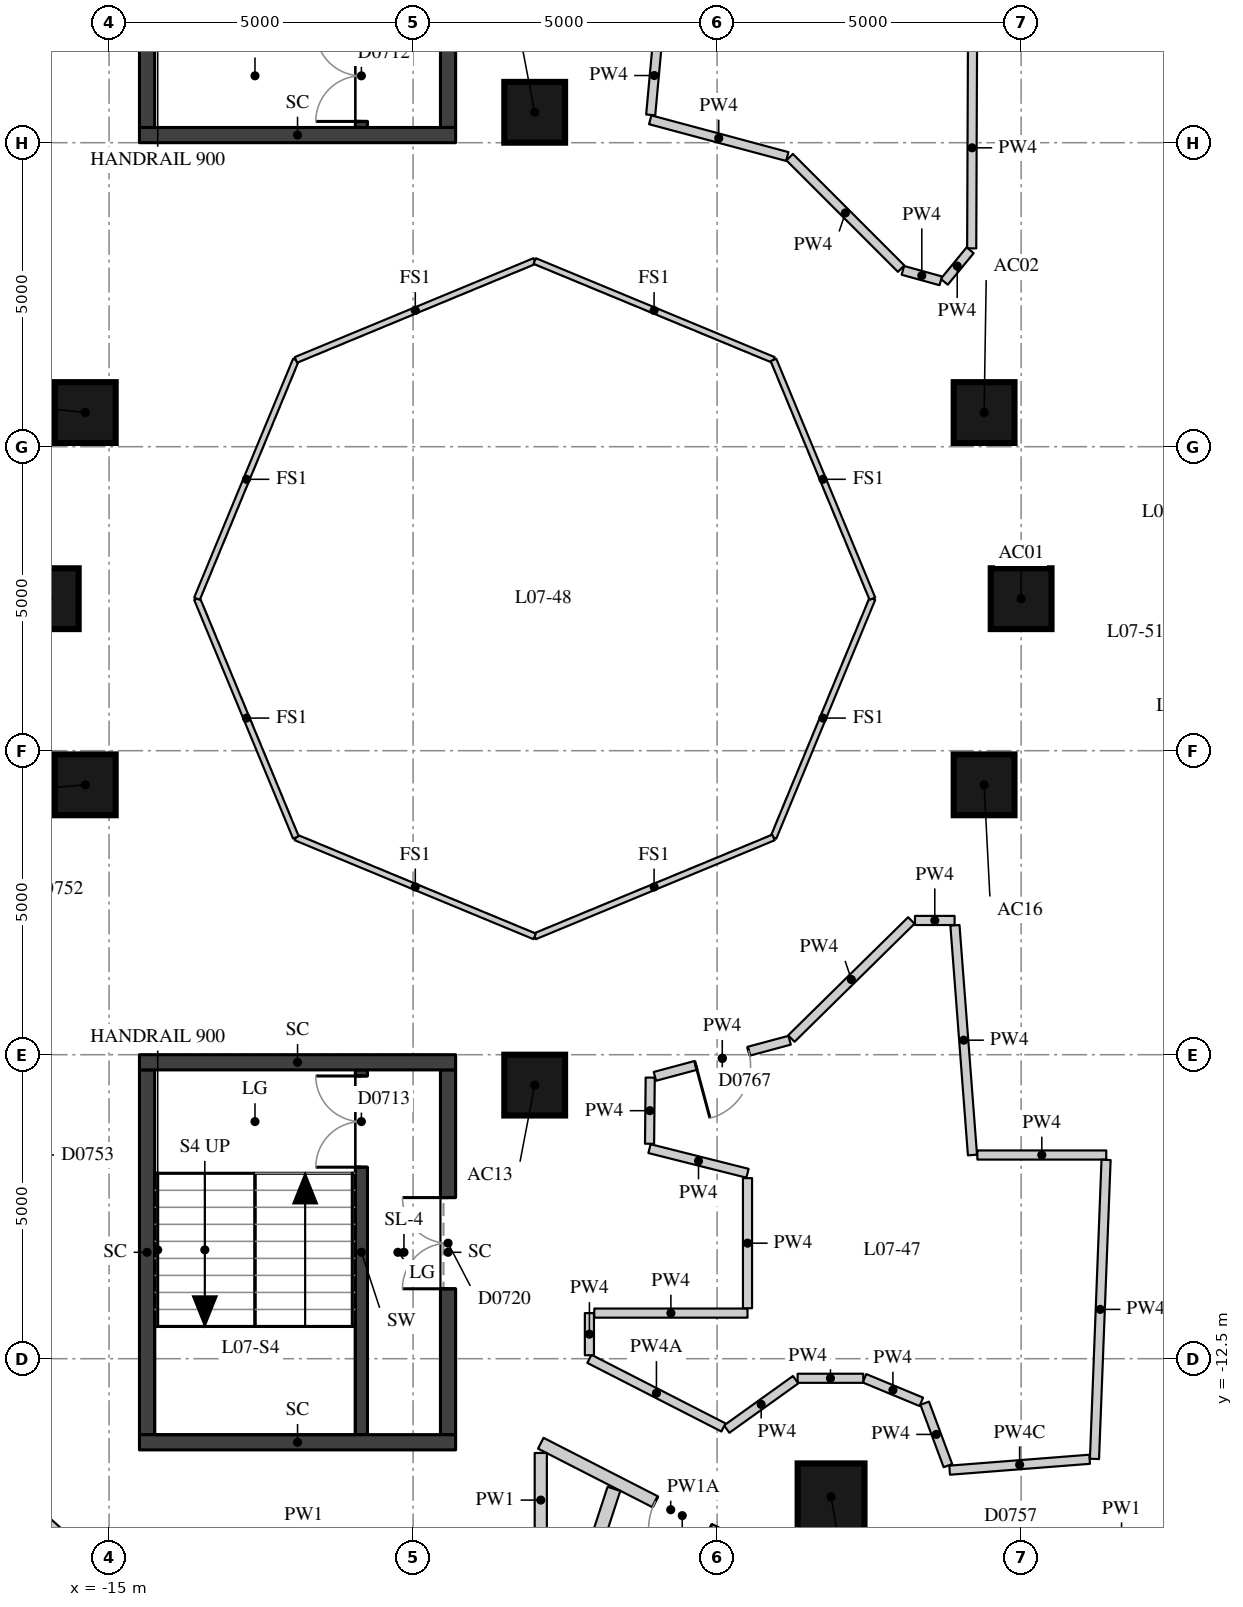
"""IFC4 building model, lengths in metres.
Left out: names, types, materials, properties, quantities, classifications, styles, units other than length and angle.
Written with IfcOpenShell. Run it as: python <this file> out.ifc"""

import sys

from ifc_helpers import new_model, si_unit, direction, frame, frame_2d, origin, origin_2d, place, context, subcontext, project, spatial, rectangle, extrude, element, fill, save


model = new_model("IFC4")
c1 = context("Model", 3, precision=1e-05, world=origin(), true_north=direction((0.0, 1.0)))
c2 = subcontext(c1, "Body", "Model", "MODEL_VIEW")
j1 = project(units=[si_unit("LENGTHUNIT", "METRE"), si_unit("PLANEANGLEUNIT", "RADIAN")], contexts=[c1])
p1 = place(None, origin())
s1 = spatial("IfcSite", under=j1, at=p1, CompositionType="ELEMENT")
p2 = place(p1, origin())
s2 = spatial("IfcBuilding", under=s1, at=p2, CompositionType="ELEMENT")
p3 = place(p2, frame((0.0, 0.0, 31.6)))
s3 = spatial("IfcBuildingStorey", under=s2, at=p3, CompositionType="ELEMENT", Elevation=31.6)
for number, where, z_axis, x_axis in (
    (1, (0.0, 0.0, 0.0), (0.0, 0.0, 1.0), (1.0, 0.0, 0.0)),
    (2, (-0.609, 3.062, 0.0), (0.0, 0.0, 1.0), (1.0, 0.0, 0.0)),
    (3, (-8.0, 8.0, 0.0), (0.0, 0.0, 1.0), (1.0, 0.0, 0.0)),
    (4, (-15.391, 3.062, 0.0), (0.0, 0.0, 1.0), (1.0, 0.0, 0.0)),
    (5, (-16.0, 0.0, 0.0), (0.0, 0.0, 1.0), (1.0, 0.0, 0.0)),
    (6, (-15.391, -3.062, 0.0), (0.0, 0.0, 1.0), (1.0, 0.0, 0.0)),
    (7, (-8.0, -8.0, 0.0), (0.0, 0.0, 1.0), (1.0, 0.0, 0.0)),
    (8, (-0.609, -3.062, 0.0), (0.0, 0.0, 1.0), (1.0, 0.0, 0.0)),
):
    element("IfcColumn", number, at=place(p3, frame(where, z_axis=z_axis, x_axis=x_axis)), inside=s3, PredefinedType="COLUMN", context=c2, shape_type="SweptSolid", body=[
        extrude(rectangle(XDim=1.0, YDim=1.0, at=origin_2d()), origin(), (0.0, 0.0, 1.0), 3.3),
    ])
p4 = place(p3, frame((-3.126, -14.772, 0.0), z_axis=(0.0, 0.0, 1.0), x_axis=(1.0, 0.0, 0.0)))
e9 = element("IfcColumn", 9, at=p4, inside=s3, PredefinedType="COLUMN", context=c2, shape_type="SweptSolid", body=[
    extrude(rectangle(XDim=1.1, YDim=1.1, at=origin_2d()), origin(), (0.0, 0.0, 1.0), 3.3),
])
p5 = place(p3, frame((-10.85, 7.75, 0.0), z_axis=(0.0, 0.0, 1.0), x_axis=(0.0, 1.0, 0.0)))
e10 = element("IfcWall", 10, at=p5, inside=s3, PredefinedType="SHEAR", context=c2, shape_type="SweptSolid", body=[
    extrude(rectangle(XDim=6.0, YDim=0.2, at=frame_2d((3.0, 0.0))), origin(), (0.0, 0.0, 1.0), 3.02),
])
p6 = place(p5, frame((0.1, 0.0, 0.0)))
e11 = element("IfcOpeningElement", 11, at=p6, cuts=e10, PredefinedType="OPENING", context=c2, shape_type="SweptSolid", body=[
    extrude(rectangle(XDim=1.5, YDim=2.1, at=frame_2d((0.75, 1.05))), frame((0.0, 0.11, 0.0), z_axis=(0.0, -1.0, 0.0), x_axis=(1.0, 0.0, 0.0)), (0.0, 0.0, 1.0), 0.22),
])
p7 = place(p3, frame((-10.85, -13.75, 0.0), z_axis=(0.0, 0.0, 1.0), x_axis=(0.0, 1.0, 0.0)))
e12 = element("IfcWall", 12, at=p7, inside=s3, PredefinedType="SHEAR", context=c2, shape_type="SweptSolid", body=[
    extrude(rectangle(XDim=6.0, YDim=0.2, at=frame_2d((3.0, 0.0))), origin(), (0.0, 0.0, 1.0), 3.02),
])
p8 = place(p7, frame((4.4, 0.0, 0.0)))
e13 = element("IfcOpeningElement", 13, at=p8, cuts=e12, PredefinedType="OPENING", context=c2, shape_type="SweptSolid", body=[
    extrude(rectangle(XDim=1.5, YDim=2.1, at=frame_2d((0.75, 1.05))), frame((0.0, 0.11, 0.0), z_axis=(0.0, -1.0, 0.0), x_axis=(1.0, 0.0, 0.0)), (0.0, 0.0, 1.0), 0.22),
])
p9 = place(p3, frame((-14.375, 7.75, -0.28), z_axis=(0.0, 0.0, 1.0), x_axis=(0.0, 1.0, 0.0)))
e14 = element("IfcWall", 14, at=p9, inside=s3, PredefinedType="SHEAR", context=c2, shape_type="SweptSolid", body=[
    extrude(rectangle(XDim=6.0, YDim=0.25, at=frame_2d((3.0, 0.0))), origin(), (0.0, 0.0, 1.0), 3.3),
])
p10 = place(p3, frame((-9.425, 7.75, -0.28), z_axis=(0.0, 0.0, 1.0), x_axis=(0.0, 1.0, 0.0)))
e15 = element("IfcWall", 15, at=p10, inside=s3, PredefinedType="SHEAR", context=c2, shape_type="SweptSolid", body=[
    extrude(rectangle(XDim=6.0, YDim=0.25, at=frame_2d((3.0, 0.0))), origin(), (0.0, 0.0, 1.0), 3.3),
])
p11 = place(p10, frame((2.1, 0.0, 0.28)))
e16 = element("IfcOpeningElement", 16, at=p11, cuts=e15, PredefinedType="OPENING", context=c2, shape_type="SweptSolid", body=[
    extrude(rectangle(XDim=1.5, YDim=2.1, at=frame_2d((0.75, 1.05))), frame((0.0, 0.135, 0.0), z_axis=(0.0, -1.0, 0.0), x_axis=(1.0, 0.0, 0.0)), (0.0, 0.0, 1.0), 0.27),
])
p12 = place(p3, frame((-14.5, 7.625, -0.28), z_axis=(0.0, 0.0, 1.0), x_axis=(1.0, 0.0, 0.0)))
e17 = element("IfcWall", 17, at=p12, inside=s3, PredefinedType="SHEAR", context=c2, shape_type="SweptSolid", body=[
    extrude(rectangle(XDim=5.2, YDim=0.25, at=frame_2d((2.6, 0.0))), origin(), (0.0, 0.0, 1.0), 3.3),
])
p13 = place(p3, frame((-14.375, -13.75, -0.28), z_axis=(0.0, 0.0, 1.0), x_axis=(0.0, 1.0, 0.0)))
e18 = element("IfcWall", 18, at=p13, inside=s3, PredefinedType="SHEAR", context=c2, shape_type="SweptSolid", body=[
    extrude(rectangle(XDim=6.0, YDim=0.25, at=frame_2d((3.0, 0.0))), origin(), (0.0, 0.0, 1.0), 3.3),
])
p14 = place(p3, frame((-9.425, -13.75, -0.28), z_axis=(0.0, 0.0, 1.0), x_axis=(0.0, 1.0, 0.0)))
e19 = element("IfcWall", 19, at=p14, inside=s3, PredefinedType="SHEAR", context=c2, shape_type="SweptSolid", body=[
    extrude(rectangle(XDim=6.0, YDim=0.25, at=frame_2d((3.0, 0.0))), origin(), (0.0, 0.0, 1.0), 3.3),
])
p15 = place(p14, frame((2.4, 0.0, 0.28)))
e20 = element("IfcOpeningElement", 20, at=p15, cuts=e19, PredefinedType="OPENING", context=c2, shape_type="SweptSolid", body=[
    extrude(rectangle(XDim=1.5, YDim=2.1, at=frame_2d((0.75, 1.05))), frame((0.0, 0.135, 0.0), z_axis=(0.0, -1.0, 0.0), x_axis=(1.0, 0.0, 0.0)), (0.0, 0.0, 1.0), 0.27),
])
for number, where, z_axis, x_axis in (
    (21, (-14.5, -7.625, -0.28), (0.0, 0.0, 1.0), (1.0, 0.0, 0.0)),
    (22, (-14.5, -13.875, -0.28), (0.0, 0.0, 1.0), (1.0, 0.0, 0.0)),
):
    element("IfcWall", number, at=place(p3, frame(where, z_axis=z_axis, x_axis=x_axis)), inside=s3, PredefinedType="SHEAR", context=c2, shape_type="SweptSolid", body=[
        extrude(rectangle(XDim=5.2, YDim=0.25, at=frame_2d((2.6, 0.0))), origin(), (0.0, 0.0, 1.0), 3.3),
    ])
p16 = place(p3, frame((6.84, -15.313, 0.0), z_axis=(0.0, 0.0, 1.0), x_axis=(-0.996968882229, -0.077801335898, 0.0)))
e23 = element("IfcWall", 23, at=p16, inside=s3, PredefinedType="PARTITIONING", context=c2, shape_type="SweptSolid", body=[
    extrude(rectangle(XDim=10.409, YDim=0.2, at=frame_2d((5.204, 0.0))), origin(), (0.0, 0.0, 1.0), 3.02),
])
p17 = place(p16, frame((5.773, 0.0, 0.0)))
e24 = element("IfcOpeningElement", 24, at=p17, cuts=e23, PredefinedType="OPENING", context=c2, shape_type="SweptSolid", body=[
    extrude(rectangle(XDim=1.1, YDim=2.1, at=frame_2d((0.55, 1.05))), frame((0.0, 0.11, 0.0), z_axis=(0.0, -1.0, 0.0), x_axis=(1.0, 0.0, 0.0)), (0.0, 0.0, 1.0), 0.22),
])
p18 = place(p16, frame((1.255, 0.0, 0.0)))
e25 = element("IfcOpeningElement", 25, at=p18, cuts=e23, PredefinedType="OPENING", context=c2, shape_type="SweptSolid", body=[
    extrude(rectangle(XDim=0.9, YDim=2.1, at=frame_2d((0.45, 1.05))), frame((0.0, 0.11, 0.0), z_axis=(0.0, -1.0, 0.0), x_axis=(1.0, 0.0, 0.0)), (0.0, 0.0, 1.0), 0.22),
])
p19 = place(p3, frame((-3.626, -16.078, 0.0), z_axis=(0.0, 0.0, 1.0), x_axis=(-0.890197807844, 0.455574212297, 0.0)))
e26 = element("IfcWall", 26, at=p19, inside=s3, PredefinedType="PARTITIONING", context=c2, shape_type="SweptSolid", body=[
    extrude(rectangle(XDim=4.801, YDim=0.2, at=frame_2d((2.4, 0.0))), origin(), (0.0, 0.0, 1.0), 2.57),
])
p20 = place(p19, frame((1.688, 0.0, 0.0)))
e27 = element("IfcOpeningElement", 27, at=p20, cuts=e26, PredefinedType="OPENING", context=c2, shape_type="SweptSolid", body=[
    extrude(rectangle(XDim=1.0, YDim=2.1, at=frame_2d((0.5, 1.05))), frame((0.0, 0.11, 0.0), z_axis=(0.0, -1.0, 0.0), x_axis=(1.0, 0.0, 0.0)), (0.0, 0.0, 1.0), 0.22),
])
p21 = place(p3, frame((-7.9, -14.051, 0.0), z_axis=(0.0, 0.0, 1.0), x_axis=(0.0, -1.0, 0.0)))
e28 = element("IfcWall", 28, at=p21, inside=s3, PredefinedType="PARTITIONING", context=c2, shape_type="SweptSolid", body=[
    extrude(rectangle(XDim=1.55, YDim=0.2, at=frame_2d((0.775, 0.0))), origin(), (0.0, 0.0, 1.0), 3.02),
])
p22 = place(p3, frame((-15.636, -15.56, 0.0), z_axis=(0.0, 0.0, 1.0), x_axis=(-0.744656758283, 0.667447610187, 0.0)))
e29 = element("IfcWall", 29, at=p22, inside=s3, PredefinedType="PARTITIONING", context=c2, shape_type="SweptSolid", body=[
    extrude(rectangle(XDim=0.623, YDim=0.2, at=frame_2d((0.312, 0.0))), origin(), (0.0, 0.0, 1.0), 3.02),
])
p23 = place(p3, frame((-0.8, 9.07, 0.0), z_axis=(0.0, 0.0, 1.0), x_axis=(-0.003911409193, -0.99999235041, 0.0)))
e30 = element("IfcWall", 30, at=p23, inside=s3, PredefinedType="PARTITIONING", context=c2, shape_type="SweptSolid", body=[
    extrude(rectangle(XDim=3.308, YDim=0.15, at=frame_2d((1.654, 0.0))), origin(), (0.0, 0.0, 1.0), 3.02),
])
p24 = place(p3, frame((-0.838, 5.731, 0.0), z_axis=(0.0, 0.0, 1.0), x_axis=(-0.634227442266, -0.773146526524, 0.0)))
e31 = element("IfcWall", 31, at=p24, inside=s3, PredefinedType="PARTITIONING", context=c2, shape_type="SweptSolid", body=[
    extrude(rectangle(XDim=0.671, YDim=0.15, at=frame_2d((0.336, 0.0))), origin(), (0.0, 0.0, 1.0), 3.02),
])
p25 = place(p3, frame((-1.322, 5.228, 0.0), z_axis=(0.0, 0.0, 1.0), x_axis=(-0.963895729021, 0.266279972163, 0.0)))
e32 = element("IfcWall", 32, at=p25, inside=s3, PredefinedType="PARTITIONING", context=c2, shape_type="SweptSolid", body=[
    extrude(rectangle(XDim=0.646, YDim=0.15, at=frame_2d((0.323, 0.0))), origin(), (0.0, 0.0, 1.0), 3.02),
])
p26 = place(p3, frame((-1.973, 5.428, 0.0), z_axis=(0.0, 0.0, 1.0), x_axis=(-0.707106781187, 0.707106781187, 0.0)))
e33 = element("IfcWall", 33, at=p26, inside=s3, PredefinedType="PARTITIONING", context=c2, shape_type="SweptSolid", body=[
    extrude(rectangle(XDim=2.593, YDim=0.15, at=frame_2d((1.297, 0.0))), origin(), (0.0, 0.0, 1.0), 3.02),
])
p27 = place(p3, frame((-3.846, 7.272, 0.0), z_axis=(0.0, 0.0, 1.0), x_axis=(-0.965906023197, 0.258892939941, 0.0)))
e34 = element("IfcWall", 34, at=p27, inside=s3, PredefinedType="PARTITIONING", context=c2, shape_type="SweptSolid", body=[
    extrude(rectangle(XDim=2.334, YDim=0.15, at=frame_2d((1.167, 0.0))), origin(), (0.0, 0.0, 1.0), 3.02),
])
p28 = place(p3, frame((-6.092, 7.957, 0.0), z_axis=(0.0, 0.0, 1.0), x_axis=(0.091567710563, 0.99579885237, 0.0)))
e35 = element("IfcWall", 35, at=p28, inside=s3, PredefinedType="PARTITIONING", context=c2, shape_type="SweptSolid", body=[
    extrude(rectangle(XDim=1.301, YDim=0.15, at=frame_2d((0.65, 0.0))), origin(), (0.0, 0.0, 1.0), 3.02),
])
p29 = place(p3, frame((-4.5, -9.45, 0.0), z_axis=(0.0, 0.0, 1.0), x_axis=(-0.9698567074, 0.24367594693, 0.0)))
e36 = element("IfcWall", 36, at=p29, inside=s3, PredefinedType="PARTITIONING", context=c2, shape_type="SweptSolid", body=[
    extrude(rectangle(XDim=1.662, YDim=0.15, at=frame_2d((0.831, 0.0))), origin(), (0.0, 0.0, 1.0), 3.02),
])
p30 = place(p3, frame((-6.111, -8.965, 0.0), z_axis=(0.0, 0.0, 1.0), x_axis=(0.010095962879, 0.999949034468, 0.0)))
e37 = element("IfcWall", 37, at=p30, inside=s3, PredefinedType="PARTITIONING", context=c2, shape_type="SweptSolid", body=[
    extrude(rectangle(XDim=1.088, YDim=0.15, at=frame_2d((0.544, 0.0))), origin(), (0.0, 0.0, 1.0), 3.02),
])
p31 = place(p3, frame((-6.023, -7.856, 0.0), z_axis=(0.0, 0.0, 1.0), x_axis=(0.965896736613, 0.258927584859, 0.0)))
e38 = element("IfcWall", 38, at=p31, inside=s3, PredefinedType="PARTITIONING", context=c2, shape_type="SweptSolid", body=[
    extrude(rectangle(XDim=2.294, YDim=0.15, at=frame_2d((1.147, 0.0))), origin(), (0.0, 0.0, 1.0), 3.02),
])
p32 = place(p31, frame((0.697, 0.0, 0.0)))
e39 = element("IfcOpeningElement", 39, at=p32, cuts=e38, PredefinedType="OPENING", context=c2, shape_type="SweptSolid", body=[
    extrude(rectangle(XDim=0.9, YDim=2.1, at=frame_2d((0.45, 1.05))), frame((0.0, 0.085, 0.0), z_axis=(0.0, -1.0, 0.0), x_axis=(1.0, 0.0, 0.0)), (0.0, 0.0, 1.0), 0.17),
])
p33 = place(p3, frame((-3.779, -7.234, 0.0), z_axis=(0.0, 0.0, 1.0), x_axis=(0.712684144815, 0.701485074487, 0.0)))
e40 = element("IfcWall", 40, at=p33, inside=s3, PredefinedType="PARTITIONING", context=c2, shape_type="SweptSolid", body=[
    extrude(rectangle(XDim=2.769, YDim=0.15, at=frame_2d((1.384, 0.0))), origin(), (0.0, 0.0, 1.0), 3.02),
])
p34 = place(p3, frame((-1.746, -5.292, 0.0), z_axis=(0.0, 0.0, 1.0), x_axis=(1.0, 0.0, 0.0)))
e41 = element("IfcWall", 41, at=p34, inside=s3, PredefinedType="PARTITIONING", context=c2, shape_type="SweptSolid", body=[
    extrude(rectangle(XDim=0.651, YDim=0.15, at=frame_2d((0.326, 0.0))), origin(), (0.0, 0.0, 1.0), 3.02),
])
p35 = place(p3, frame((-1.089, -5.372, 0.0), z_axis=(0.0, 0.0, 1.0), x_axis=(0.076169209517, -0.997094905975, 0.0)))
e42 = element("IfcWall", 42, at=p35, inside=s3, PredefinedType="PARTITIONING", context=c2, shape_type="SweptSolid", body=[
    extrude(rectangle(XDim=3.789, YDim=0.15, at=frame_2d((1.894, 0.0))), origin(), (0.0, 0.0, 1.0), 3.02),
])
p36 = place(p3, frame((-0.72, -9.15, 0.0), z_axis=(0.0, 0.0, 1.0), x_axis=(1.0, 0.0, 0.0)))
e43 = element("IfcWall", 43, at=p36, inside=s3, PredefinedType="PARTITIONING", context=c2, shape_type="SweptSolid", body=[
    extrude(rectangle(XDim=2.12, YDim=0.15, at=frame_2d((1.06, 0.0))), origin(), (0.0, 0.0, 1.0), 3.02),
])
p37 = place(p3, frame((1.397, -9.23, 0.0), z_axis=(0.0, 0.0, 1.0), x_axis=(-0.038741742932, -0.99924925687, 0.0)))
e44 = element("IfcWall", 44, at=p37, inside=s3, PredefinedType="PARTITIONING", context=c2, shape_type="SweptSolid", body=[
    extrude(rectangle(XDim=4.922, YDim=0.15, at=frame_2d((2.461, 0.0))), origin(), (0.0, 0.0, 1.0), 3.02),
])
p38 = place(p3, frame((1.126, -14.154, 0.0), z_axis=(0.0, 0.0, 1.0), x_axis=(-0.996959190057, -0.077925434624, 0.0)))
e45 = element("IfcWall", 45, at=p38, inside=s3, PredefinedType="PARTITIONING", context=c2, shape_type="SweptSolid", body=[
    extrude(rectangle(XDim=2.309, YDim=0.15, at=frame_2d((1.155, 0.0))), origin(), (0.0, 0.0, 1.0), 2.42),
])
p39 = place(p3, frame((-1.204, -14.259, 0.0), z_axis=(0.0, 0.0, 1.0), x_axis=(-0.348483202919, 0.937315025636, 0.0)))
e46 = element("IfcWall", 46, at=p39, inside=s3, PredefinedType="PARTITIONING", context=c2, shape_type="SweptSolid", body=[
    extrude(rectangle(XDim=1.095, YDim=0.15, at=frame_2d((0.547, 0.0))), origin(), (0.0, 0.0, 1.0), 3.02),
])
p40 = place(p3, frame((-1.641, -13.209, 0.0), z_axis=(0.0, 0.0, 1.0), x_axis=(-0.923725449546, 0.383055209937, 0.0)))
e47 = element("IfcWall", 47, at=p40, inside=s3, PredefinedType="PARTITIONING", context=c2, shape_type="SweptSolid", body=[
    extrude(rectangle(XDim=1.011, YDim=0.15, at=frame_2d((0.506, 0.0))), origin(), (0.0, 0.0, 1.0), 3.02),
])
p41 = place(p3, frame((-2.596, -12.822, 0.0), z_axis=(0.0, 0.0, 1.0), x_axis=(-1.0, 0.0, 0.0)))
e48 = element("IfcWall", 48, at=p41, inside=s3, PredefinedType="PARTITIONING", context=c2, shape_type="SweptSolid", body=[
    extrude(rectangle(XDim=1.08, YDim=0.15, at=frame_2d((0.54, 0.0))), origin(), (0.0, 0.0, 1.0), 3.02),
])
p42 = place(p3, frame((-3.708, -12.845, 0.0), z_axis=(0.0, 0.0, 1.0), x_axis=(-0.812857190658, -0.58246303539, 0.0)))
e49 = element("IfcWall", 49, at=p42, inside=s3, PredefinedType="PARTITIONING", context=c2, shape_type="SweptSolid", body=[
    extrude(rectangle(XDim=1.395, YDim=0.15, at=frame_2d((0.697, 0.0))), origin(), (0.0, 0.0, 1.0), 3.02),
])
p43 = place(p3, frame((-4.896, -13.631, 0.0), z_axis=(0.0, 0.0, 1.0), x_axis=(-0.890208185307, 0.455553934032, 0.0)))
e50 = element("IfcWall", 50, at=p43, inside=s3, PredefinedType="PARTITIONING", context=c2, shape_type="SweptSolid", body=[
    extrude(rectangle(XDim=2.477, YDim=0.15, at=frame_2d((1.238, 0.0))), origin(), (0.0, 0.0, 1.0), 2.57),
])
p44 = place(p3, frame((-7.1, -12.442, 0.0), z_axis=(0.0, 0.0, 1.0), x_axis=(0.0, 1.0, 0.0)))
e51 = element("IfcWall", 51, at=p44, inside=s3, PredefinedType="PARTITIONING", context=c2, shape_type="SweptSolid", body=[
    extrude(rectangle(XDim=0.692, YDim=0.15, at=frame_2d((0.346, 0.0))), origin(), (0.0, 0.0, 1.0), 3.02),
])
p45 = place(p3, frame((-7.02, -11.75, 0.0), z_axis=(0.0, 0.0, 1.0), x_axis=(1.0, 0.0, 0.0)))
e52 = element("IfcWall", 52, at=p45, inside=s3, PredefinedType="PARTITIONING", context=c2, shape_type="SweptSolid", body=[
    extrude(rectangle(XDim=2.52, YDim=0.15, at=frame_2d((1.26, 0.0))), origin(), (0.0, 0.0, 1.0), 3.02),
])
p46 = place(p3, frame((-4.5, -11.67, 0.0), z_axis=(0.0, 0.0, 1.0), x_axis=(0.0, 1.0, 0.0)))
e53 = element("IfcWall", 53, at=p46, inside=s3, PredefinedType="PARTITIONING", context=c2, shape_type="SweptSolid", body=[
    extrude(rectangle(XDim=2.14, YDim=0.15, at=frame_2d((1.07, 0.0))), origin(), (0.0, 0.0, 1.0), 3.02),
])
p47 = place(p3, frame((-9.429, -23.014, 0.0), z_axis=(0.0, 0.0, 1.0), x_axis=(0.310242805557, 0.950657352362, 0.0)))
e54 = element("IfcWall", 54, at=p47, inside=s3, PredefinedType="PARTITIONING", context=c2, shape_type="SweptSolid", body=[
    extrude(rectangle(XDim=8.808, YDim=0.22, at=frame_2d((4.404, 0.0))), origin(), (0.0, 0.0, 1.0), 3.02),
])
for number, where, z_axis, x_axis in (
    (55, (-2.446, 0.0, 0.0), (0.0, 0.0, 1.0), (-0.383, -0.924, 0.0)),
    (56, (-4.073, -3.927, 0.0), (0.0, 0.0, 1.0), (-0.924, -0.383, 0.0)),
    (57, (-8.0, -5.554, 0.0), (0.0, 0.0, 1.0), (-0.924, 0.383, 0.0)),
    (58, (-11.927, -3.927, 0.0), (0.0, 0.0, 1.0), (-0.383, 0.924, 0.0)),
    (59, (-13.554, 0.0, 0.0), (0.0, 0.0, 1.0), (0.383, 0.924, 0.0)),
    (60, (-11.927, 3.927, 0.0), (0.0, 0.0, 1.0), (0.924, 0.383, 0.0)),
    (61, (-8.0, 5.554, 0.0), (0.0, 0.0, 1.0), (0.924, -0.383, 0.0)),
    (62, (-4.073, 3.927, 0.0), (0.0, 0.0, 1.0), (0.383, -0.924, 0.0)),
):
    element("IfcWall", number, at=place(p3, frame(where, z_axis=z_axis, x_axis=x_axis)), inside=s3, PredefinedType="PARTITIONING", context=c2, shape_type="SweptSolid", body=[
        extrude(rectangle(XDim=4.251, YDim=0.1, at=frame_2d((2.125, 0.0))), origin(), (0.0, 0.0, 1.0), 3.02),
    ])
p48 = place(p6, origin())
e63 = element("IfcDoor", 63, at=p48, inside=s3, OperationType="DOUBLE_DOOR_SINGLE_SWING", PredefinedType="DOOR", context=c2, shape_type="SweptSolid", body=[
    extrude(rectangle(XDim=1.5, YDim=2.1, at=frame_2d((0.75, 1.05))), frame((0.0, 0.025, 0.0), z_axis=(0.0, -1.0, 0.0), x_axis=(1.0, 0.0, 0.0)), (0.0, 0.0, 1.0), 0.05),
])
fill(e11, e63)
p49 = place(p8, origin())
e64 = element("IfcDoor", 64, at=p49, inside=s3, OperationType="DOUBLE_DOOR_SINGLE_SWING", PredefinedType="DOOR", context=c2, shape_type="SweptSolid", body=[
    extrude(rectangle(XDim=1.5, YDim=2.1, at=frame_2d((0.75, 1.05))), frame((0.0, 0.025, 0.0), z_axis=(0.0, -1.0, 0.0), x_axis=(1.0, 0.0, 0.0)), (0.0, 0.0, 1.0), 0.05),
])
fill(e13, e64)
p50 = place(p15, origin())
e65 = element("IfcDoor", 65, at=p50, inside=s3, OperationType="DOUBLE_DOOR_SINGLE_SWING", PredefinedType="DOOR", context=c2, shape_type="SweptSolid", body=[
    extrude(rectangle(XDim=1.5, YDim=2.1, at=frame_2d((0.75, 1.05))), frame((0.0, 0.025, 0.0), z_axis=(0.0, -1.0, 0.0), x_axis=(1.0, 0.0, 0.0)), (0.0, 0.0, 1.0), 0.05),
])
fill(e20, e65)
p51 = place(p20, origin())
e66 = element("IfcDoor", 66, at=p51, inside=s3, OperationType="SINGLE_SWING_LEFT", PredefinedType="DOOR", context=c2, shape_type="SweptSolid", body=[
    extrude(rectangle(XDim=1.0, YDim=2.1, at=frame_2d((0.5, 1.05))), frame((0.0, 0.025, 0.0), z_axis=(0.0, -1.0, 0.0), x_axis=(1.0, 0.0, 0.0)), (0.0, 0.0, 1.0), 0.05),
])
fill(e27, e66)
p52 = place(p32, origin())
e67 = element("IfcDoor", 67, at=p52, inside=s3, OperationType="SINGLE_SWING_RIGHT", PredefinedType="DOOR", context=c2, shape_type="SweptSolid", body=[
    extrude(rectangle(XDim=0.9, YDim=2.1, at=frame_2d((0.45, 1.05))), frame((0.0, 0.025, 0.0), z_axis=(0.0, -1.0, 0.0), x_axis=(1.0, 0.0, 0.0)), (0.0, 0.0, 1.0), 0.05),
])
fill(e39, e67)
save(model, sys.argv[1])
